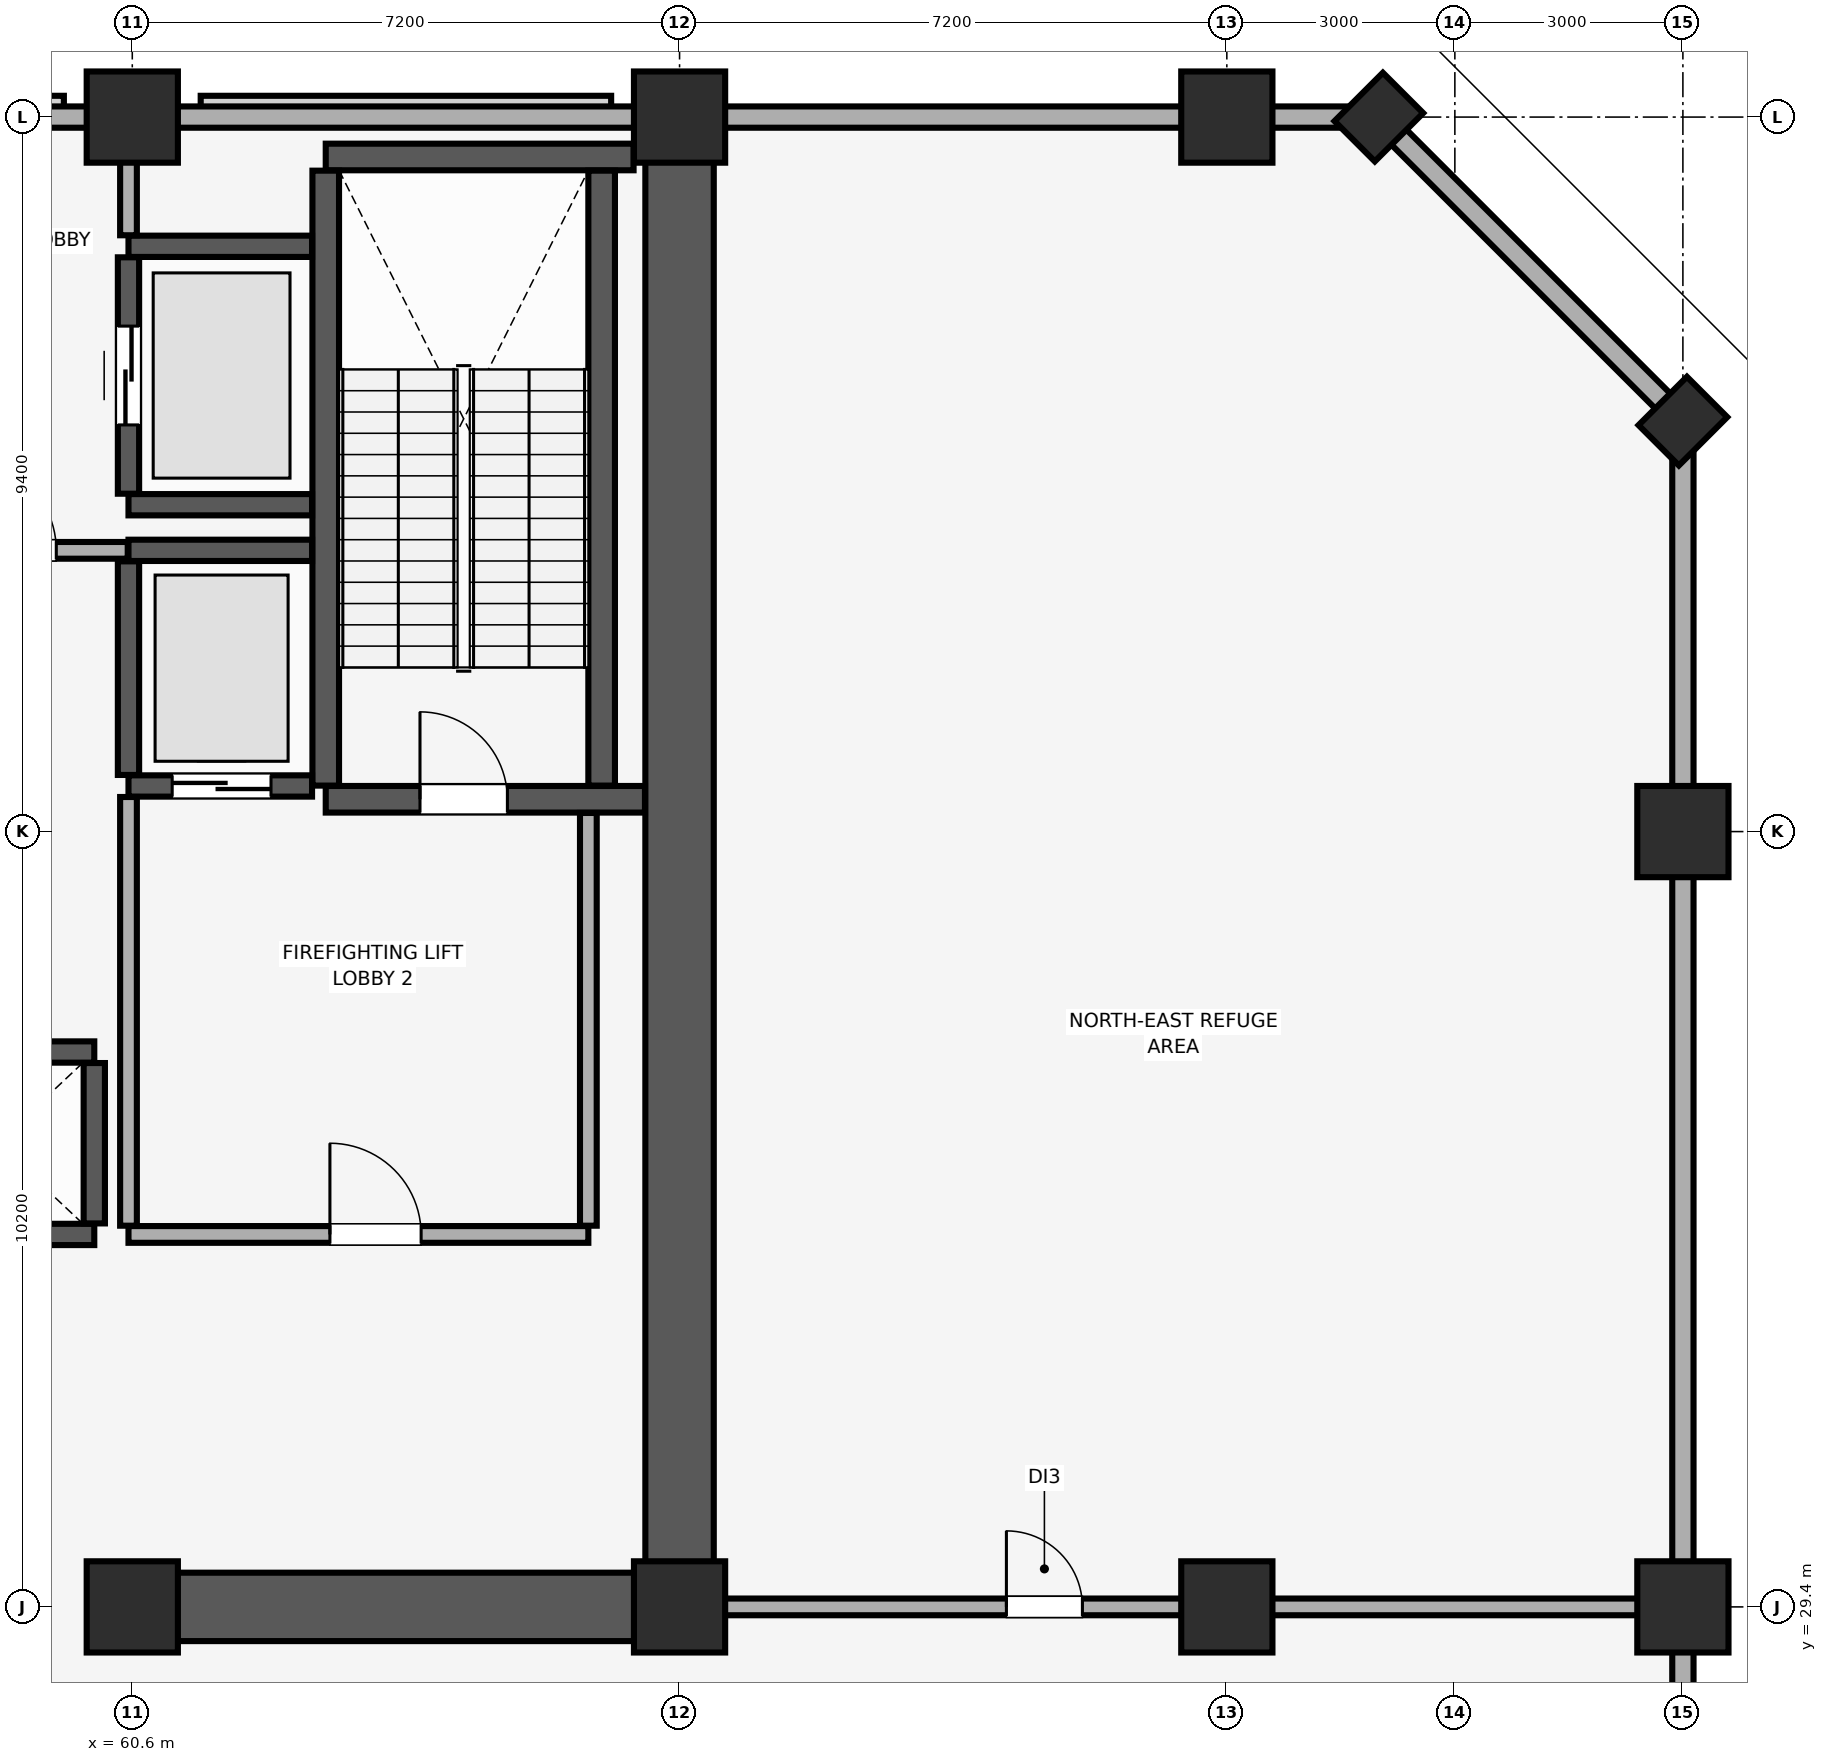
"""IFC4 building model, lengths in metres.
Left out: names, types, materials, properties, quantities, classifications, styles, units other than length and angle.
Written with IfcOpenShell. Run it as: python <this file> out.ifc"""

import sys

from ifc_helpers import new_model, si_unit, direction, frame, frame_2d, origin, origin_2d, place, context, subcontext, project, spatial, rectangle, extrude, element, fill, save


model = new_model("IFC4")
c1 = context("Model", 3, precision=1e-05, world=origin(), true_north=direction((0.0, 1.0)))
c2 = subcontext(c1, "Body", "Model", "MODEL_VIEW")
j1 = project(units=[si_unit("LENGTHUNIT", "METRE"), si_unit("PLANEANGLEUNIT", "RADIAN")], contexts=[c1])
p1 = place(None, origin())
s1 = spatial("IfcSite", under=j1, at=p1, CompositionType="ELEMENT")
p2 = place(p1, origin())
s2 = spatial("IfcBuilding", under=s1, at=p2, CompositionType="ELEMENT")
p3 = place(p2, frame((0.0, 0.0, 184.75)))
s3 = spatial("IfcBuildingStorey", under=s2, at=p3, CompositionType="ELEMENT", Elevation=184.75)
for number, where, z_axis, x_axis in (
    (1, (81.0, 29.4, 0.0), (0.0, 0.0, 1.0), (1.0, 0.0, 0.0)),
    (2, (81.0, 39.6, 0.0), (0.0, 0.0, 1.0), (1.0, 0.0, 0.0)),
):
    element("IfcColumn", number, at=place(p3, frame(where, z_axis=z_axis, x_axis=x_axis)), inside=s3, PredefinedType="COLUMN", context=c2, shape_type="SweptSolid", body=[
        extrude(rectangle(XDim=1.2, YDim=1.2, at=origin_2d()), origin(), (0.0, 0.0, 1.0), 5.16),
    ])
for number, where, z_axis, x_axis in (
    (3, (81.0, 45.0, 0.0), (0.0, 0.0, 1.0), (0.707, 0.707, 0.0)),
    (4, (77.0, 49.0, 0.0), (0.0, 0.0, 1.0), (0.707, 0.707, 0.0)),
):
    element("IfcColumn", number, at=place(p3, frame(where, z_axis=z_axis, x_axis=x_axis)), inside=s3, PredefinedType="PILASTER", context=c2, shape_type="SweptSolid", body=[
        extrude(rectangle(XDim=0.9, YDim=0.75, at=origin_2d()), origin(), (0.0, 0.0, 1.0), 5.16),
    ])
for number, where, z_axis, x_axis in (
    (5, (60.6, 29.4, 0.0), (0.0, 0.0, 1.0), (1.0, 0.0, 0.0)),
    (6, (60.6, 49.0, 0.0), (0.0, 0.0, 1.0), (1.0, 0.0, 0.0)),
    (7, (67.8, 29.4, 0.0), (0.0, 0.0, 1.0), (1.0, 0.0, 0.0)),
    (8, (67.8, 49.0, 0.0), (0.0, 0.0, 1.0), (1.0, 0.0, 0.0)),
    (9, (75.0, 29.4, 0.0), (0.0, 0.0, 1.0), (1.0, 0.0, 0.0)),
    (10, (75.0, 49.0, 0.0), (0.0, 0.0, 1.0), (1.0, 0.0, 0.0)),
):
    element("IfcColumn", number, at=place(p3, frame(where, z_axis=z_axis, x_axis=x_axis)), inside=s3, PredefinedType="COLUMN", context=c2, shape_type="SweptSolid", body=[
        extrude(rectangle(XDim=1.2, YDim=1.2, at=origin_2d()), origin(), (0.0, 0.0, 1.0), 5.16),
    ])
p4 = place(p3, frame((81.0, 7.0, 0.0), z_axis=(0.0, 0.0, 1.0), x_axis=(0.0, 1.0, 0.0)))
e11 = element("IfcWall", 11, at=p4, inside=s3, PredefinedType="SOLIDWALL", context=c2, shape_type="SweptSolid", body=[
    extrude(rectangle(XDim=38.0, YDim=0.28, at=frame_2d((19.0, 0.0))), origin(), (0.0, 0.0, 1.0), 4.36),
])
p5 = place(p3, frame((81.0, 45.0, 0.0), z_axis=(0.0, 0.0, 1.0), x_axis=(-0.707106781187, 0.707106781187, 0.0)))
e12 = element("IfcWall", 12, at=p5, inside=s3, PredefinedType="SOLIDWALL", context=c2, shape_type="SweptSolid", body=[
    extrude(rectangle(XDim=5.657, YDim=0.28, at=frame_2d((2.828, 0.0))), origin(), (0.0, 0.0, 1.0), 4.36),
])
p6 = place(p3, frame((77.0, 49.0, 0.0), z_axis=(0.0, 0.0, 1.0), x_axis=(-1.0, 0.0, 0.0)))
e13 = element("IfcWall", 13, at=p6, inside=s3, PredefinedType="SOLIDWALL", context=c2, shape_type="SweptSolid", body=[
    extrude(rectangle(XDim=70.0, YDim=0.28, at=frame_2d((35.0, 0.0))), origin(), (0.0, 0.0, 1.0), 4.36),
])
p7 = place(p3, frame((67.8, 29.4, 0.0), z_axis=(0.0, 0.0, 1.0), x_axis=(0.0, 1.0, 0.0)))
e14 = element("IfcWall", 14, at=p7, inside=s3, PredefinedType="SHEAR", context=c2, shape_type="SweptSolid", body=[
    extrude(rectangle(XDim=19.2, YDim=0.9, at=frame_2d((9.6, 0.0))), origin(), (0.0, 0.0, 1.0), 5.16),
])
p8 = place(p3, frame((60.4, 29.4, 0.0), z_axis=(0.0, 0.0, 1.0), x_axis=(1.0, 0.0, 0.0)))
e15 = element("IfcWall", 15, at=p8, inside=s3, PredefinedType="SHEAR", context=c2, shape_type="SweptSolid", body=[
    extrude(rectangle(XDim=6.945, YDim=0.9, at=frame_2d((3.473, 0.0))), origin(), (0.0, 0.0, 1.0), 5.16),
])
p9 = place(p3, frame((63.145, 40.025, 0.0), z_axis=(0.0, 0.0, 1.0), x_axis=(1.0, 0.0, 0.0)))
e16 = element("IfcWall", 16, at=p9, inside=s3, PredefinedType="SHEAR", context=c2, shape_type="SweptSolid", body=[
    extrude(rectangle(XDim=4.2, YDim=0.35, at=frame_2d((2.1, 0.0))), origin(), (0.0, 0.0, 1.0), 5.16),
])
p10 = place(p9, frame((1.24, 0.0, 0.0)))
e17 = element("IfcOpeningElement", 17, at=p10, cuts=e16, PredefinedType="OPENING", context=c2, shape_type="SweptSolid", body=[
    extrude(rectangle(XDim=1.15, YDim=2.15, at=frame_2d((0.575, 1.075))), frame((0.0, 0.185, 0.0), z_axis=(0.0, -1.0, 0.0), x_axis=(1.0, 0.0, 0.0)), (0.0, 0.0, 1.0), 0.37),
])
p11 = place(p3, frame((63.145, 48.475, 0.0), z_axis=(0.0, 0.0, 1.0), x_axis=(1.0, 0.0, 0.0)))
e18 = element("IfcWall", 18, at=p11, inside=s3, PredefinedType="SHEAR", context=c2, shape_type="SweptSolid", body=[
    extrude(rectangle(XDim=4.05, YDim=0.35, at=frame_2d((2.025, 0.0))), origin(), (0.0, 0.0, 1.0), 5.16),
])
for number, where, z_axis, x_axis in (
    (19, (63.145, 40.205, 0.0), (0.0, 0.0, 1.0), (0.0, 1.0, 0.0)),
    (20, (66.775, 40.205, 0.0), (0.0, 0.0, 1.0), (0.0, 1.0, 0.0)),
):
    element("IfcWall", number, at=place(p3, frame(where, z_axis=z_axis, x_axis=x_axis)), inside=s3, PredefinedType="SHEAR", context=c2, shape_type="SweptSolid", body=[
        extrude(rectangle(XDim=8.09, YDim=0.35, at=frame_2d((4.045, 0.0))), origin(), (0.0, 0.0, 1.0), 5.16),
    ])
for number, where, z_axis, x_axis in (
    (21, (57.55, 34.3, 0.0), (0.0, 0.0, 1.0), (1.0, 0.0, 0.0)),
    (22, (57.55, 36.7, 0.0), (0.0, 0.0, 1.0), (1.0, 0.0, 0.0)),
):
    element("IfcWall", number, at=place(p3, frame(where, z_axis=z_axis, x_axis=x_axis)), inside=s3, PredefinedType="SHEAR", context=c2, shape_type="SweptSolid", body=[
        extrude(rectangle(XDim=2.55, YDim=0.28, at=frame_2d((1.275, 0.0))), origin(), (0.0, 0.0, 1.0), 5.16),
    ])
p12 = place(p3, frame((60.1, 34.445, 0.0), z_axis=(0.0, 0.0, 1.0), x_axis=(0.0, 1.0, 0.0)))
e23 = element("IfcWall", 23, at=p12, inside=s3, PredefinedType="SHEAR", context=c2, shape_type="SweptSolid", body=[
    extrude(rectangle(XDim=2.11, YDim=0.28, at=frame_2d((1.055, 0.0))), origin(), (0.0, 0.0, 1.0), 5.16),
])
p13 = place(p3, frame((60.55, 40.2, 0.0), z_axis=(0.0, 0.0, 1.0), x_axis=(1.0, 0.0, 0.0)))
e24 = element("IfcWall", 24, at=p13, inside=s3, PredefinedType="SHEAR", context=c2, shape_type="SweptSolid", body=[
    extrude(rectangle(XDim=2.415, YDim=0.28, at=frame_2d((1.208, 0.0))), origin(), (0.0, 0.0, 1.0), 5.16),
])
p14 = place(p13, frame((0.575, 0.0, 0.0)))
e25 = element("IfcOpeningElement", 25, at=p14, cuts=e24, PredefinedType="OPENING", context=c2, shape_type="SweptSolid", body=[
    extrude(rectangle(XDim=1.3, YDim=2.3, at=frame_2d((0.65, 1.15))), frame((0.0, 0.15, 0.0), z_axis=(0.0, -1.0, 0.0), x_axis=(1.0, 0.0, 0.0)), (0.0, 0.0, 1.0), 0.3),
])
p15 = place(p3, frame((60.55, 43.3, 0.0), z_axis=(0.0, 0.0, 1.0), x_axis=(1.0, 0.0, 0.0)))
e26 = element("IfcWall", 26, at=p15, inside=s3, PredefinedType="SHEAR", context=c2, shape_type="SweptSolid", body=[
    extrude(rectangle(XDim=2.415, YDim=0.28, at=frame_2d((1.208, 0.0))), origin(), (0.0, 0.0, 1.0), 5.16),
])
p16 = place(p3, frame((60.55, 40.345, 0.0), z_axis=(0.0, 0.0, 1.0), x_axis=(0.0, 1.0, 0.0)))
e27 = element("IfcWall", 27, at=p16, inside=s3, PredefinedType="SHEAR", context=c2, shape_type="SweptSolid", body=[
    extrude(rectangle(XDim=2.81, YDim=0.28, at=frame_2d((1.405, 0.0))), origin(), (0.0, 0.0, 1.0), 5.16),
])
for number, where, z_axis, x_axis in (
    (28, (60.55, 43.9, 0.0), (0.0, 0.0, 1.0), (1.0, 0.0, 0.0)),
    (29, (60.55, 47.3, 0.0), (0.0, 0.0, 1.0), (1.0, 0.0, 0.0)),
):
    element("IfcWall", number, at=place(p3, frame(where, z_axis=z_axis, x_axis=x_axis)), inside=s3, PredefinedType="SHEAR", context=c2, shape_type="SweptSolid", body=[
        extrude(rectangle(XDim=2.415, YDim=0.28, at=frame_2d((1.208, 0.0))), origin(), (0.0, 0.0, 1.0), 5.16),
    ])
p17 = place(p3, frame((60.55, 44.045, 0.0), z_axis=(0.0, 0.0, 1.0), x_axis=(0.0, 1.0, 0.0)))
e30 = element("IfcWall", 30, at=p17, inside=s3, PredefinedType="SHEAR", context=c2, shape_type="SweptSolid", body=[
    extrude(rectangle(XDim=3.11, YDim=0.28, at=frame_2d((1.555, 0.0))), origin(), (0.0, 0.0, 1.0), 5.16),
])
p18 = place(p17, frame((0.905, 0.0, 0.0)))
e31 = element("IfcOpeningElement", 31, at=p18, cuts=e30, PredefinedType="OPENING", context=c2, shape_type="SweptSolid", body=[
    extrude(rectangle(XDim=1.3, YDim=2.3, at=frame_2d((0.65, 1.15))), frame((0.0, 0.15, 0.0), z_axis=(0.0, -1.0, 0.0), x_axis=(1.0, 0.0, 0.0)), (0.0, 0.0, 1.0), 0.3),
])
p19 = place(p3, frame((60.55, 34.3, 0.0), z_axis=(0.0, 0.0, 1.0), x_axis=(1.0, 0.0, 0.0)))
e32 = element("IfcWall", 32, at=p19, inside=s3, PredefinedType="PARTITIONING", context=c2, shape_type="SweptSolid", body=[
    extrude(rectangle(XDim=6.05, YDim=0.22, at=frame_2d((3.025, 0.0))), origin(), (0.0, 0.0, 1.0), 5.16),
])
p20 = place(p19, frame((2.65, 0.0, 0.0)))
e33 = element("IfcOpeningElement", 33, at=p20, cuts=e32, PredefinedType="OPENING", context=c2, shape_type="SweptSolid", body=[
    extrude(rectangle(XDim=1.2, YDim=2.15, at=frame_2d((0.6, 1.075))), frame((0.0, 0.12, 0.0), z_axis=(0.0, -1.0, 0.0), x_axis=(1.0, 0.0, 0.0)), (0.0, 0.0, 1.0), 0.24),
])
p21 = place(p3, frame((60.55, 34.415, 0.0), z_axis=(0.0, 0.0, 1.0), x_axis=(0.0, 1.0, 0.0)))
e34 = element("IfcWall", 34, at=p21, inside=s3, PredefinedType="PARTITIONING", context=c2, shape_type="SweptSolid", body=[
    extrude(rectangle(XDim=5.64, YDim=0.22, at=frame_2d((2.82, 0.0))), origin(), (0.0, 0.0, 1.0), 5.16),
])
p22 = place(p3, frame((66.6, 34.415, 0.0), z_axis=(0.0, 0.0, 1.0), x_axis=(0.0, 1.0, 0.0)))
e35 = element("IfcWall", 35, at=p22, inside=s3, PredefinedType="PARTITIONING", context=c2, shape_type="SweptSolid", body=[
    extrude(rectangle(XDim=5.43, YDim=0.22, at=frame_2d((2.715, 0.0))), origin(), (0.0, 0.0, 1.0), 5.16),
])
p23 = place(p3, frame((57.5, 43.3, 0.0), z_axis=(0.0, 0.0, 1.0), x_axis=(1.0, 0.0, 0.0)))
e36 = element("IfcWall", 36, at=p23, inside=s3, PredefinedType="PARTITIONING", context=c2, shape_type="SweptSolid", body=[
    extrude(rectangle(XDim=3.04, YDim=0.22, at=frame_2d((1.52, 0.0))), origin(), (0.0, 0.0, 1.0), 5.16),
])
p24 = place(p23, frame((0.9, 0.0, 0.0)))
e37 = element("IfcOpeningElement", 37, at=p24, cuts=e36, PredefinedType="OPENING", context=c2, shape_type="SweptSolid", body=[
    extrude(rectangle(XDim=1.2, YDim=2.15, at=frame_2d((0.6, 1.075))), frame((0.0, 0.12, 0.0), z_axis=(0.0, -1.0, 0.0), x_axis=(1.0, 0.0, 0.0)), (0.0, 0.0, 1.0), 0.24),
])
p25 = place(p3, frame((60.55, 47.445, 0.0), z_axis=(0.0, 0.0, 1.0), x_axis=(0.0, 1.0, 0.0)))
e38 = element("IfcWall", 38, at=p25, inside=s3, PredefinedType="PARTITIONING", context=c2, shape_type="SweptSolid", body=[
    extrude(rectangle(XDim=1.405, YDim=0.22, at=frame_2d((0.703, 0.0))), origin(), (0.0, 0.0, 1.0), 5.16),
])
p26 = place(p3, frame((68.255, 29.4, 0.0), z_axis=(0.0, 0.0, 1.0), x_axis=(1.0, 0.0, 0.0)))
e39 = element("IfcWall", 39, at=p26, inside=s3, PredefinedType="PARTITIONING", context=c2, shape_type="SweptSolid", body=[
    extrude(rectangle(XDim=12.595, YDim=0.22, at=frame_2d((6.298, 0.0))), origin(), (0.0, 0.0, 1.0), 4.51),
])
p27 = place(p26, frame((3.845, 0.0, 0.0)))
e40 = element("IfcOpeningElement", 40, at=p27, cuts=e39, PredefinedType="OPENING", context=c2, shape_type="SweptSolid", body=[
    extrude(rectangle(XDim=1.0, YDim=2.15, at=frame_2d((0.5, 1.075))), frame((0.0, 0.12, 0.0), z_axis=(0.0, -1.0, 0.0), x_axis=(1.0, 0.0, 0.0)), (0.0, 0.0, 1.0), 0.24),
])
p28 = place(p10, origin())
e41 = element("IfcDoor", 41, at=p28, inside=s3, OperationType="SINGLE_SWING_LEFT", PredefinedType="DOOR", context=c2, shape_type="SweptSolid", body=[
    extrude(rectangle(XDim=1.15, YDim=2.15, at=frame_2d((0.575, 1.075))), frame((0.0, 0.025, 0.0), z_axis=(0.0, -1.0, 0.0), x_axis=(1.0, 0.0, 0.0)), (0.0, 0.0, 1.0), 0.05),
])
fill(e17, e41)
p29 = place(p14, origin())
e42 = element("IfcDoor", 42, at=p29, inside=s3, OperationType="DOUBLE_DOOR_SLIDING", PredefinedType="DOOR", context=c2, shape_type="SweptSolid", body=[
    extrude(rectangle(XDim=1.3, YDim=2.3, at=frame_2d((0.65, 1.15))), frame((0.0, 0.025, 0.0), z_axis=(0.0, -1.0, 0.0), x_axis=(1.0, 0.0, 0.0)), (0.0, 0.0, 1.0), 0.05),
])
fill(e25, e42)
p30 = place(p18, origin())
e43 = element("IfcDoor", 43, at=p30, inside=s3, OperationType="DOUBLE_DOOR_SLIDING", PredefinedType="DOOR", context=c2, shape_type="SweptSolid", body=[
    extrude(rectangle(XDim=1.3, YDim=2.3, at=frame_2d((0.65, 1.15))), frame((0.0, 0.025, 0.0), z_axis=(0.0, -1.0, 0.0), x_axis=(1.0, 0.0, 0.0)), (0.0, 0.0, 1.0), 0.05),
])
fill(e31, e43)
p31 = place(p20, origin())
e44 = element("IfcDoor", 44, at=p31, inside=s3, OperationType="SINGLE_SWING_LEFT", PredefinedType="DOOR", context=c2, shape_type="SweptSolid", body=[
    extrude(rectangle(XDim=1.2, YDim=2.15, at=frame_2d((0.6, 1.075))), frame((0.0, 0.025, 0.0), z_axis=(0.0, -1.0, 0.0), x_axis=(1.0, 0.0, 0.0)), (0.0, 0.0, 1.0), 0.05),
])
fill(e33, e44)
p32 = place(p24, origin())
e45 = element("IfcDoor", 45, at=p32, inside=s3, OperationType="SINGLE_SWING_LEFT", PredefinedType="DOOR", context=c2, shape_type="SweptSolid", body=[
    extrude(rectangle(XDim=1.2, YDim=2.15, at=frame_2d((0.6, 1.075))), frame((0.0, 0.025, 0.0), z_axis=(0.0, -1.0, 0.0), x_axis=(1.0, 0.0, 0.0)), (0.0, 0.0, 1.0), 0.05),
])
fill(e37, e45)
p33 = place(p27, origin())
e46 = element("IfcDoor", 46, at=p33, inside=s3, OperationType="SINGLE_SWING_LEFT", PredefinedType="DOOR", context=c2, shape_type="SweptSolid", body=[
    extrude(rectangle(XDim=1.0, YDim=2.15, at=frame_2d((0.5, 1.075))), frame((0.0, 0.025, 0.0), z_axis=(0.0, -1.0, 0.0), x_axis=(1.0, 0.0, 0.0)), (0.0, 0.0, 1.0), 0.05),
])
fill(e40, e46)
save(model, sys.argv[1])
